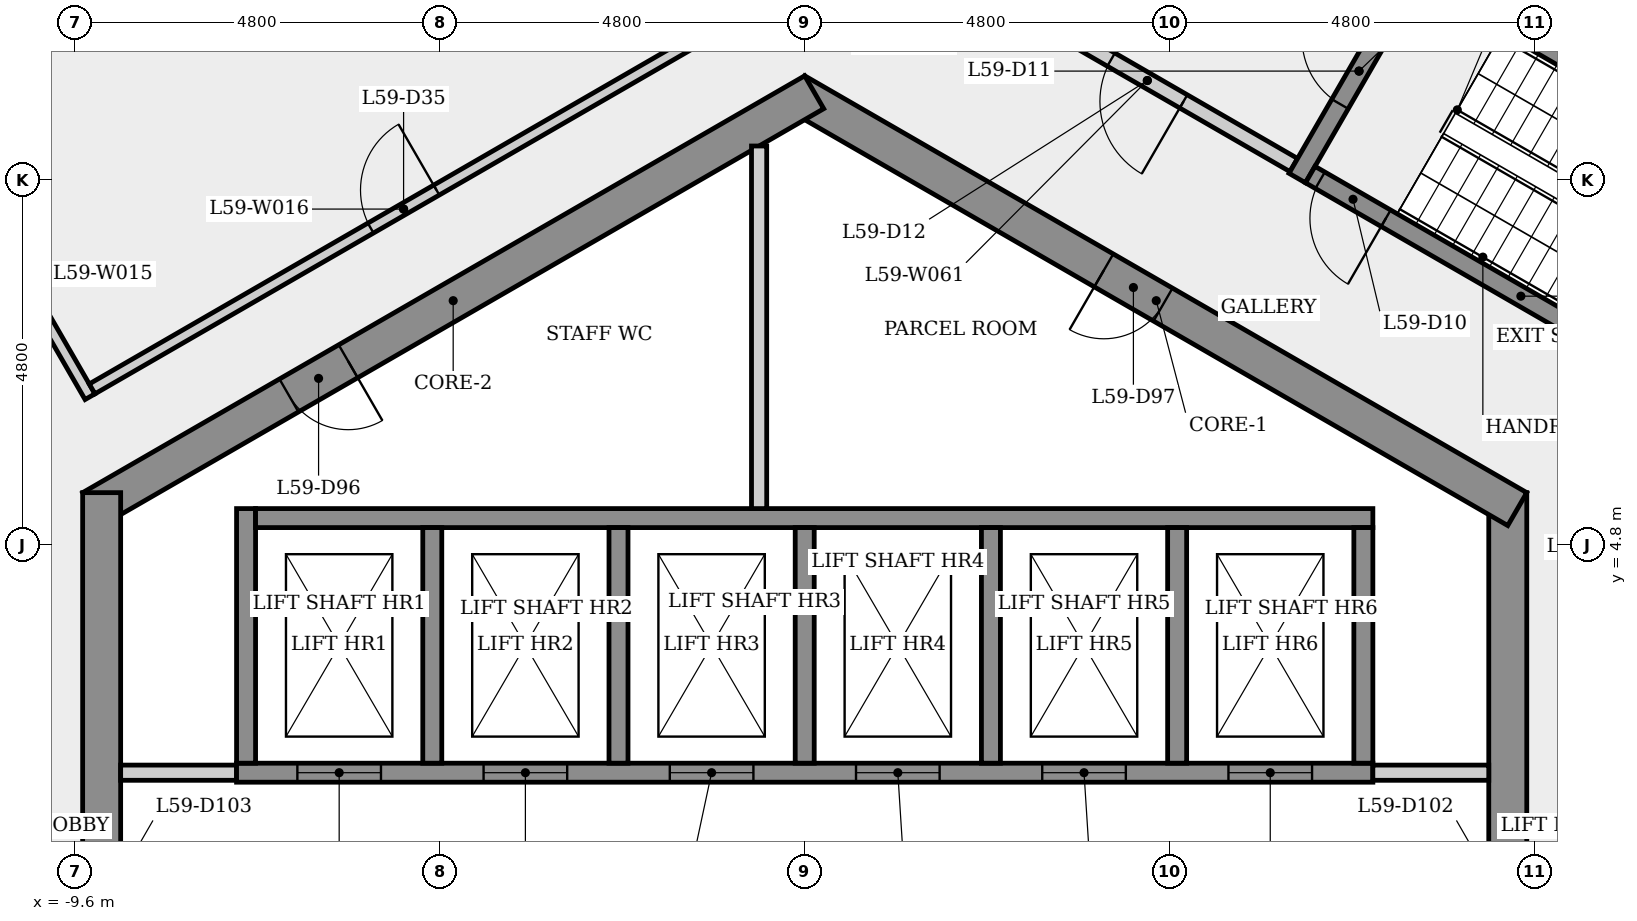
"""IFC4 building model, lengths in metres.
Left out: names, types, materials, properties, quantities, classifications, styles, units other than length and angle.
Written with IfcOpenShell. Run it as: python <this file> out.ifc"""

import sys

from ifc_helpers import new_model, si_unit, direction, frame, frame_2d, origin, place, context, subcontext, project, spatial, rectangle, extrude, element, fill, save


model = new_model("IFC4")
c1 = context("Model", 3, precision=1e-05, world=origin(), true_north=direction((0.0, 1.0)))
c2 = subcontext(c1, "Body", "Model", "MODEL_VIEW")
j1 = project(units=[si_unit("LENGTHUNIT", "METRE"), si_unit("PLANEANGLEUNIT", "RADIAN")], contexts=[c1])
p1 = place(None, origin())
s1 = spatial("IfcSite", under=j1, at=p1, CompositionType="ELEMENT")
p2 = place(p1, origin())
s2 = spatial("IfcBuilding", under=s1, at=p2, CompositionType="ELEMENT")
p3 = place(p2, frame((0.0, 0.0, 222.3)))
s3 = spatial("IfcBuildingStorey", under=s2, at=p3, CompositionType="ELEMENT", Elevation=222.3)
p4 = place(p3, frame((9.25, -5.485, 0.0), z_axis=(0.0, 0.0, 1.0), x_axis=(0.0, 1.0, 0.0)))
e1 = element("IfcWall", 1, at=p4, inside=s3, PredefinedType="SHEAR", context=c2, shape_type="SweptSolid", body=[
    extrude(rectangle(XDim=10.97, YDim=0.5, at=frame_2d((5.485, 0.0))), origin(), (0.0, 0.0, 1.0), 3.4),
])
p5 = place(p4, frame((4.685, 0.0, 0.0)))
e2 = element("IfcOpeningElement", 2, at=p5, cuts=e1, PredefinedType="OPENING", context=c2, shape_type="SweptSolid", body=[
    extrude(rectangle(XDim=1.6, YDim=2.1, at=frame_2d((0.8, 1.05))), frame((0.0, 0.26, 0.0), z_axis=(0.0, -1.0, 0.0), x_axis=(1.0, 0.0, 0.0)), (0.0, 0.0, 1.0), 0.52),
])
p6 = place(p3, frame((9.375, 5.268, 0.0), z_axis=(0.0, 0.0, 1.0), x_axis=(-0.866023993627, 0.500002442456, 0.0)))
e3 = element("IfcWall", 3, at=p6, inside=s3, PredefinedType="SHEAR", context=c2, shape_type="SweptSolid", body=[
    extrude(rectangle(XDim=10.97, YDim=0.5, at=frame_2d((5.485, 0.0))), origin(), (0.0, 0.0, 1.0), 3.4),
])
p7 = place(p6, frame((5.382, 0.0, 0.0)))
e4 = element("IfcOpeningElement", 4, at=p7, cuts=e3, PredefinedType="OPENING", context=c2, shape_type="SweptSolid", body=[
    extrude(rectangle(XDim=0.9, YDim=2.1, at=frame_2d((0.45, 1.05))), frame((0.0, 0.26, 0.0), z_axis=(0.0, -1.0, 0.0), x_axis=(1.0, 0.0, 0.0)), (0.0, 0.0, 1.0), 0.52),
])
p8 = place(p3, frame((0.125, 10.753, 0.0), z_axis=(0.0, 0.0, 1.0), x_axis=(-0.866023993627, -0.500002442456, 0.0)))
e5 = element("IfcWall", 5, at=p8, inside=s3, PredefinedType="SHEAR", context=c2, shape_type="SweptSolid", body=[
    extrude(rectangle(XDim=10.97, YDim=0.5, at=frame_2d((5.485, 0.0))), origin(), (0.0, 0.0, 1.0), 3.4),
])
p9 = place(p8, frame((7.08, 0.0, 0.0)))
e6 = element("IfcOpeningElement", 6, at=p9, cuts=e5, PredefinedType="OPENING", context=c2, shape_type="SweptSolid", body=[
    extrude(rectangle(XDim=0.9, YDim=2.1, at=frame_2d((0.45, 1.05))), frame((0.0, 0.26, 0.0), z_axis=(0.0, -1.0, 0.0), x_axis=(1.0, 0.0, 0.0)), (0.0, 0.0, 1.0), 0.52),
])
p10 = place(p3, frame((-9.25, 5.485, 0.0), z_axis=(0.0, 0.0, 1.0), x_axis=(0.0, -1.0, 0.0)))
e7 = element("IfcWall", 7, at=p10, inside=s3, PredefinedType="SHEAR", context=c2, shape_type="SweptSolid", body=[
    extrude(rectangle(XDim=10.97, YDim=0.5, at=frame_2d((5.485, 0.0))), origin(), (0.0, 0.0, 1.0), 3.4),
])
p11 = place(p10, frame((8.51, 0.0, 0.0)))
e8 = element("IfcOpeningElement", 8, at=p11, cuts=e7, PredefinedType="OPENING", context=c2, shape_type="SweptSolid", body=[
    extrude(rectangle(XDim=0.9, YDim=2.1, at=frame_2d((0.45, 1.05))), frame((0.0, 0.26, 0.0), z_axis=(0.0, -1.0, 0.0), x_axis=(1.0, 0.0, 0.0)), (0.0, 0.0, 1.0), 0.52),
])
p12 = place(p10, frame((4.685, 0.0, 0.0)))
e9 = element("IfcOpeningElement", 9, at=p12, cuts=e7, PredefinedType="OPENING", context=c2, shape_type="SweptSolid", body=[
    extrude(rectangle(XDim=1.6, YDim=2.1, at=frame_2d((0.8, 1.05))), frame((0.0, 0.26, 0.0), z_axis=(0.0, -1.0, 0.0), x_axis=(1.0, 0.0, 0.0)), (0.0, 0.0, 1.0), 0.52),
])
p13 = place(p3, frame((-11.262, 9.967, 0.0), z_axis=(0.0, 0.0, 1.0), x_axis=(0.499995303914, -0.866028115054, 0.0)))
e10 = element("IfcWall", 10, at=p13, inside=s3, PredefinedType="PARTITIONING", context=c2, shape_type="SweptSolid", body=[
    extrude(rectangle(XDim=3.718, YDim=0.15, at=frame_2d((1.859, 0.0))), origin(), (0.0, 0.0, 1.0), 3.05),
])
p14 = place(p3, frame((-9.376, 6.85, 0.0), z_axis=(0.0, 0.0, 1.0), x_axis=(0.866029654818, 0.499992636921, 0.0)))
e11 = element("IfcWall", 11, at=p14, inside=s3, PredefinedType="PARTITIONING", context=c2, shape_type="SweptSolid", body=[
    extrude(rectangle(XDim=9.465, YDim=0.15, at=frame_2d((4.732, 0.0))), origin(), (0.0, 0.0, 1.0), 3.05),
])
p15 = place(p14, frame((4.232, 0.0, 0.0)))
e12 = element("IfcOpeningElement", 12, at=p15, cuts=e11, PredefinedType="OPENING", context=c2, shape_type="SweptSolid", body=[
    extrude(rectangle(XDim=1.0, YDim=2.1, at=frame_2d((0.5, 1.05))), frame((0.0, 0.085, 0.0), z_axis=(0.0, -1.0, 0.0), x_axis=(1.0, 0.0, 0.0)), (0.0, 0.0, 1.0), 0.17),
])
p16 = place(p3, frame((-9.0, 1.8, 0.0), z_axis=(0.0, 0.0, 1.0), x_axis=(1.0, 0.0, 0.0)))
e13 = element("IfcWall", 13, at=p16, inside=s3, PredefinedType="PARTITIONING", context=c2, shape_type="SweptSolid", body=[
    extrude(rectangle(XDim=1.525, YDim=0.2, at=frame_2d((0.763, 0.0))), origin(), (0.0, 0.0, 1.0), 3.05),
])
p17 = place(p3, frame((-7.475, 1.8, 0.0), z_axis=(0.0, 0.0, 1.0), x_axis=(1.0, 0.0, 0.0)))
e14 = element("IfcWall", 14, at=p17, inside=s3, PredefinedType="SHEAR", context=c2, shape_type="SweptSolid", body=[
    extrude(rectangle(XDim=14.95, YDim=0.25, at=frame_2d((7.475, 0.0))), origin(), (0.0, 0.0, 1.0), 3.05),
])
p18 = place(p17, frame((0.8, 0.0, 0.0)))
e15 = element("IfcOpeningElement", 15, at=p18, cuts=e14, PredefinedType="OPENING", context=c2, shape_type="SweptSolid", body=[
    extrude(rectangle(XDim=1.1, YDim=2.1, at=frame_2d((0.55, 1.05))), frame((0.0, 0.135, 0.0), z_axis=(0.0, -1.0, 0.0), x_axis=(1.0, 0.0, 0.0)), (0.0, 0.0, 1.0), 0.27),
])
p19 = place(p17, frame((3.25, 0.0, 0.0)))
e16 = element("IfcOpeningElement", 16, at=p19, cuts=e14, PredefinedType="OPENING", context=c2, shape_type="SweptSolid", body=[
    extrude(rectangle(XDim=1.1, YDim=2.1, at=frame_2d((0.55, 1.05))), frame((0.0, 0.135, 0.0), z_axis=(0.0, -1.0, 0.0), x_axis=(1.0, 0.0, 0.0)), (0.0, 0.0, 1.0), 0.27),
])
p20 = place(p17, frame((5.7, 0.0, 0.0)))
e17 = element("IfcOpeningElement", 17, at=p20, cuts=e14, PredefinedType="OPENING", context=c2, shape_type="SweptSolid", body=[
    extrude(rectangle(XDim=1.1, YDim=2.1, at=frame_2d((0.55, 1.05))), frame((0.0, 0.135, 0.0), z_axis=(0.0, -1.0, 0.0), x_axis=(1.0, 0.0, 0.0)), (0.0, 0.0, 1.0), 0.27),
])
p21 = place(p17, frame((8.15, 0.0, 0.0)))
e18 = element("IfcOpeningElement", 18, at=p21, cuts=e14, PredefinedType="OPENING", context=c2, shape_type="SweptSolid", body=[
    extrude(rectangle(XDim=1.1, YDim=2.1, at=frame_2d((0.55, 1.05))), frame((0.0, 0.135, 0.0), z_axis=(0.0, -1.0, 0.0), x_axis=(1.0, 0.0, 0.0)), (0.0, 0.0, 1.0), 0.27),
])
p22 = place(p17, frame((10.6, 0.0, 0.0)))
e19 = element("IfcOpeningElement", 19, at=p22, cuts=e14, PredefinedType="OPENING", context=c2, shape_type="SweptSolid", body=[
    extrude(rectangle(XDim=1.1, YDim=2.1, at=frame_2d((0.55, 1.05))), frame((0.0, 0.135, 0.0), z_axis=(0.0, -1.0, 0.0), x_axis=(1.0, 0.0, 0.0)), (0.0, 0.0, 1.0), 0.27),
])
p23 = place(p17, frame((13.05, 0.0, 0.0)))
e20 = element("IfcOpeningElement", 20, at=p23, cuts=e14, PredefinedType="OPENING", context=c2, shape_type="SweptSolid", body=[
    extrude(rectangle(XDim=1.1, YDim=2.1, at=frame_2d((0.55, 1.05))), frame((0.0, 0.135, 0.0), z_axis=(0.0, -1.0, 0.0), x_axis=(1.0, 0.0, 0.0)), (0.0, 0.0, 1.0), 0.27),
])
p24 = place(p3, frame((-7.35, 1.925, 0.0), z_axis=(0.0, 0.0, 1.0), x_axis=(0.0, 1.0, 0.0)))
e21 = element("IfcWall", 21, at=p24, inside=s3, PredefinedType="SHEAR", context=c2, shape_type="SweptSolid", body=[
    extrude(rectangle(XDim=3.35, YDim=0.25, at=frame_2d((1.675, 0.0))), origin(), (0.0, 0.0, 1.0), 3.05),
])
p25 = place(p3, frame((-7.225, 5.15, 0.0), z_axis=(0.0, 0.0, 1.0), x_axis=(1.0, 0.0, 0.0)))
e22 = element("IfcWall", 22, at=p25, inside=s3, PredefinedType="SHEAR", context=c2, shape_type="SweptSolid", body=[
    extrude(rectangle(XDim=14.7, YDim=0.25, at=frame_2d((7.35, 0.0))), origin(), (0.0, 0.0, 1.0), 3.05),
])
for number, where, z_axis, x_axis in (
    (23, (-4.9, 5.025, 0.0), (0.0, 0.0, 1.0), (0.0, -1.0, 0.0)),
    (24, (-2.45, 5.025, 0.0), (0.0, 0.0, 1.0), (0.0, -1.0, 0.0)),
):
    element("IfcWall", number, at=place(p3, frame(where, z_axis=z_axis, x_axis=x_axis)), inside=s3, PredefinedType="SHEAR", context=c2, shape_type="SweptSolid", body=[
        extrude(rectangle(XDim=3.1, YDim=0.25, at=frame_2d((1.55, 0.0))), origin(), (0.0, 0.0, 1.0), 3.4),
    ])
p26 = place(p3, frame((-0.6, 10.046, 0.0), z_axis=(0.0, 0.0, 1.0), x_axis=(0.0, -1.0, 0.0)))
e25 = element("IfcWall", 25, at=p26, inside=s3, PredefinedType="PARTITIONING", context=c2, shape_type="SweptSolid", body=[
    extrude(rectangle(XDim=4.771, YDim=0.2, at=frame_2d((2.385, 0.0))), origin(), (0.0, 0.0, 1.0), 3.05),
])
for number, where, z_axis, x_axis in (
    (26, (0.0, 5.025, 0.0), (0.0, 0.0, 1.0), (0.0, -1.0, 0.0)),
    (27, (2.45, 5.025, 0.0), (0.0, 0.0, 1.0), (0.0, -1.0, 0.0)),
    (28, (4.9, 5.025, 0.0), (0.0, 0.0, 1.0), (0.0, -1.0, 0.0)),
):
    element("IfcWall", number, at=place(p3, frame(where, z_axis=z_axis, x_axis=x_axis)), inside=s3, PredefinedType="SHEAR", context=c2, shape_type="SweptSolid", body=[
        extrude(rectangle(XDim=3.1, YDim=0.25, at=frame_2d((1.55, 0.0))), origin(), (0.0, 0.0, 1.0), 3.4),
    ])
p27 = place(p3, frame((6.435, 9.795, 0.0), z_axis=(0.0, 0.0, 1.0), x_axis=(-0.866012907634, 0.500021643343, 0.0)))
e29 = element("IfcWall", 29, at=p27, inside=s3, PredefinedType="PARTITIONING", context=c2, shape_type="SweptSolid", body=[
    extrude(rectangle(XDim=4.45, YDim=0.2, at=frame_2d((2.225, 0.0))), origin(), (0.0, 0.0, 1.0), 3.05),
])
p28 = place(p27, frame((1.675, 0.0, 0.0)))
e30 = element("IfcOpeningElement", 30, at=p28, cuts=e29, PredefinedType="OPENING", context=c2, shape_type="SweptSolid", body=[
    extrude(rectangle(XDim=1.1, YDim=2.1, at=frame_2d((0.55, 1.05))), frame((0.0, 0.11, 0.0), z_axis=(0.0, -1.0, 0.0), x_axis=(1.0, 0.0, 0.0)), (0.0, 0.0, 1.0), 0.22),
])
p29 = place(p3, frame((6.48, 9.624, 0.0), z_axis=(0.0, 0.0, 1.0), x_axis=(0.500017246033, 0.866015446554, 0.0)))
e31 = element("IfcWall", 31, at=p29, inside=s3, PredefinedType="SHEAR", context=c2, shape_type="SweptSolid", body=[
    extrude(rectangle(XDim=3.25, YDim=0.25, at=frame_2d((1.625, 0.0))), origin(), (0.0, 0.0, 1.0), 3.05),
])
p30 = place(p29, frame((1.125, 0.0, 0.0)))
e32 = element("IfcOpeningElement", 32, at=p30, cuts=e31, PredefinedType="OPENING", context=c2, shape_type="SweptSolid", body=[
    extrude(rectangle(XDim=1.0, YDim=2.1, at=frame_2d((0.5, 1.05))), frame((0.0, 0.135, 0.0), z_axis=(0.0, -1.0, 0.0), x_axis=(1.0, 0.0, 0.0)), (0.0, 0.0, 1.0), 0.27),
])
p31 = place(p3, frame((7.475, 1.8, 0.0), z_axis=(0.0, 0.0, 1.0), x_axis=(1.0, 0.0, 0.0)))
e33 = element("IfcWall", 33, at=p31, inside=s3, PredefinedType="PARTITIONING", context=c2, shape_type="SweptSolid", body=[
    extrude(rectangle(XDim=1.525, YDim=0.2, at=frame_2d((0.763, 0.0))), origin(), (0.0, 0.0, 1.0), 3.05),
])
p32 = place(p3, frame((7.35, 5.025, 0.0), z_axis=(0.0, 0.0, 1.0), x_axis=(0.0, -1.0, 0.0)))
e34 = element("IfcWall", 34, at=p32, inside=s3, PredefinedType="SHEAR", context=c2, shape_type="SweptSolid", body=[
    extrude(rectangle(XDim=3.1, YDim=0.25, at=frame_2d((1.55, 0.0))), origin(), (0.0, 0.0, 1.0), 3.4),
])
p33 = place(p3, frame((8.151, 12.268, 0.0), z_axis=(0.0, 0.0, 1.0), x_axis=(0.866025499775, -0.499999833739, 0.0)))
e35 = element("IfcWall", 35, at=p33, inside=s3, PredefinedType="SHEAR", context=c2, shape_type="SweptSolid", body=[
    extrude(rectangle(XDim=6.4, YDim=0.25, at=frame_2d((3.2, 0.0))), origin(), (0.0, 0.0, 1.0), 3.05),
])
p34 = place(p3, frame((12.194, 6.47, 0.0), z_axis=(0.0, 0.0, 1.0), x_axis=(-0.866025499775, 0.499999833739, 0.0)))
e36 = element("IfcWall", 36, at=p34, inside=s3, PredefinedType="SHEAR", context=c2, shape_type="SweptSolid", body=[
    extrude(rectangle(XDim=6.4, YDim=0.25, at=frame_2d((3.2, 0.0))), origin(), (0.0, 0.0, 1.0), 3.05),
])
p35 = place(p34, frame((5.25, 0.0, 0.0)))
e37 = element("IfcOpeningElement", 37, at=p35, cuts=e36, PredefinedType="OPENING", context=c2, shape_type="SweptSolid", body=[
    extrude(rectangle(XDim=1.0, YDim=2.1, at=frame_2d((0.5, 1.05))), frame((0.0, 0.135, 0.0), z_axis=(0.0, -1.0, 0.0), x_axis=(1.0, 0.0, 0.0)), (0.0, 0.0, 1.0), 0.27),
])
p36 = place(p18, origin())
e38 = element("IfcDoor", 38, at=p36, inside=s3, OperationType="SLIDING_TO_LEFT", PredefinedType="DOOR", context=c2, shape_type="SweptSolid", body=[
    extrude(rectangle(XDim=1.1, YDim=2.1, at=frame_2d((0.55, 1.05))), frame((0.0, 0.025, 0.0), z_axis=(0.0, -1.0, 0.0), x_axis=(1.0, 0.0, 0.0)), (0.0, 0.0, 1.0), 0.05),
])
fill(e15, e38)
p37 = place(p19, origin())
e39 = element("IfcDoor", 39, at=p37, inside=s3, OperationType="SLIDING_TO_LEFT", PredefinedType="DOOR", context=c2, shape_type="SweptSolid", body=[
    extrude(rectangle(XDim=1.1, YDim=2.1, at=frame_2d((0.55, 1.05))), frame((0.0, 0.025, 0.0), z_axis=(0.0, -1.0, 0.0), x_axis=(1.0, 0.0, 0.0)), (0.0, 0.0, 1.0), 0.05),
])
fill(e16, e39)
p38 = place(p20, origin())
e40 = element("IfcDoor", 40, at=p38, inside=s3, OperationType="SLIDING_TO_LEFT", PredefinedType="DOOR", context=c2, shape_type="SweptSolid", body=[
    extrude(rectangle(XDim=1.1, YDim=2.1, at=frame_2d((0.55, 1.05))), frame((0.0, 0.025, 0.0), z_axis=(0.0, -1.0, 0.0), x_axis=(1.0, 0.0, 0.0)), (0.0, 0.0, 1.0), 0.05),
])
fill(e17, e40)
p39 = place(p21, origin())
e41 = element("IfcDoor", 41, at=p39, inside=s3, OperationType="SLIDING_TO_LEFT", PredefinedType="DOOR", context=c2, shape_type="SweptSolid", body=[
    extrude(rectangle(XDim=1.1, YDim=2.1, at=frame_2d((0.55, 1.05))), frame((0.0, 0.025, 0.0), z_axis=(0.0, -1.0, 0.0), x_axis=(1.0, 0.0, 0.0)), (0.0, 0.0, 1.0), 0.05),
])
fill(e18, e41)
p40 = place(p22, origin())
e42 = element("IfcDoor", 42, at=p40, inside=s3, OperationType="SLIDING_TO_LEFT", PredefinedType="DOOR", context=c2, shape_type="SweptSolid", body=[
    extrude(rectangle(XDim=1.1, YDim=2.1, at=frame_2d((0.55, 1.05))), frame((0.0, 0.025, 0.0), z_axis=(0.0, -1.0, 0.0), x_axis=(1.0, 0.0, 0.0)), (0.0, 0.0, 1.0), 0.05),
])
fill(e19, e42)
p41 = place(p23, origin())
e43 = element("IfcDoor", 43, at=p41, inside=s3, OperationType="SLIDING_TO_LEFT", PredefinedType="DOOR", context=c2, shape_type="SweptSolid", body=[
    extrude(rectangle(XDim=1.1, YDim=2.1, at=frame_2d((0.55, 1.05))), frame((0.0, 0.025, 0.0), z_axis=(0.0, -1.0, 0.0), x_axis=(1.0, 0.0, 0.0)), (0.0, 0.0, 1.0), 0.05),
])
fill(e20, e43)
p42 = place(p35, origin())
e44 = element("IfcDoor", 44, at=p42, inside=s3, OperationType="SINGLE_SWING_LEFT", PredefinedType="DOOR", context=c2, shape_type="SweptSolid", body=[
    extrude(rectangle(XDim=1.0, YDim=2.1, at=frame_2d((0.5, 1.05))), frame((0.0, 0.025, 0.0), z_axis=(0.0, -1.0, 0.0), x_axis=(1.0, 0.0, 0.0)), (0.0, 0.0, 1.0), 0.05),
])
fill(e37, e44)
p43 = place(p30, origin())
e45 = element("IfcDoor", 45, at=p43, inside=s3, OperationType="SINGLE_SWING_RIGHT", PredefinedType="DOOR", context=c2, shape_type="SweptSolid", body=[
    extrude(rectangle(XDim=1.0, YDim=2.1, at=frame_2d((0.5, 1.05))), frame((0.0, 0.025, 0.0), z_axis=(0.0, -1.0, 0.0), x_axis=(1.0, 0.0, 0.0)), (0.0, 0.0, 1.0), 0.05),
])
fill(e32, e45)
p44 = place(p28, origin())
e46 = element("IfcDoor", 46, at=p44, inside=s3, OperationType="SINGLE_SWING_LEFT", PredefinedType="DOOR", context=c2, shape_type="SweptSolid", body=[
    extrude(rectangle(XDim=1.1, YDim=2.1, at=frame_2d((0.55, 1.05))), frame((0.0, 0.025, 0.0), z_axis=(0.0, -1.0, 0.0), x_axis=(1.0, 0.0, 0.0)), (0.0, 0.0, 1.0), 0.05),
])
fill(e30, e46)
p45 = place(p15, origin())
e47 = element("IfcDoor", 47, at=p45, inside=s3, OperationType="SINGLE_SWING_RIGHT", PredefinedType="DOOR", context=c2, shape_type="SweptSolid", body=[
    extrude(rectangle(XDim=1.0, YDim=2.1, at=frame_2d((0.5, 1.05))), frame((0.0, 0.025, 0.0), z_axis=(0.0, -1.0, 0.0), x_axis=(1.0, 0.0, 0.0)), (0.0, 0.0, 1.0), 0.05),
])
fill(e12, e47)
p46 = place(p9, origin())
e48 = element("IfcDoor", 48, at=p46, inside=s3, OperationType="SINGLE_SWING_LEFT", PredefinedType="DOOR", context=c2, shape_type="SweptSolid", body=[
    extrude(rectangle(XDim=0.9, YDim=2.1, at=frame_2d((0.45, 1.05))), frame((0.0, 0.025, 0.0), z_axis=(0.0, -1.0, 0.0), x_axis=(1.0, 0.0, 0.0)), (0.0, 0.0, 1.0), 0.05),
])
fill(e6, e48)
p47 = place(p7, origin())
e49 = element("IfcDoor", 49, at=p47, inside=s3, OperationType="SINGLE_SWING_RIGHT", PredefinedType="DOOR", context=c2, shape_type="SweptSolid", body=[
    extrude(rectangle(XDim=0.9, YDim=2.1, at=frame_2d((0.45, 1.05))), frame((0.0, 0.025, 0.0), z_axis=(0.0, -1.0, 0.0), x_axis=(1.0, 0.0, 0.0)), (0.0, 0.0, 1.0), 0.05),
])
fill(e4, e49)
save(model, sys.argv[1])
